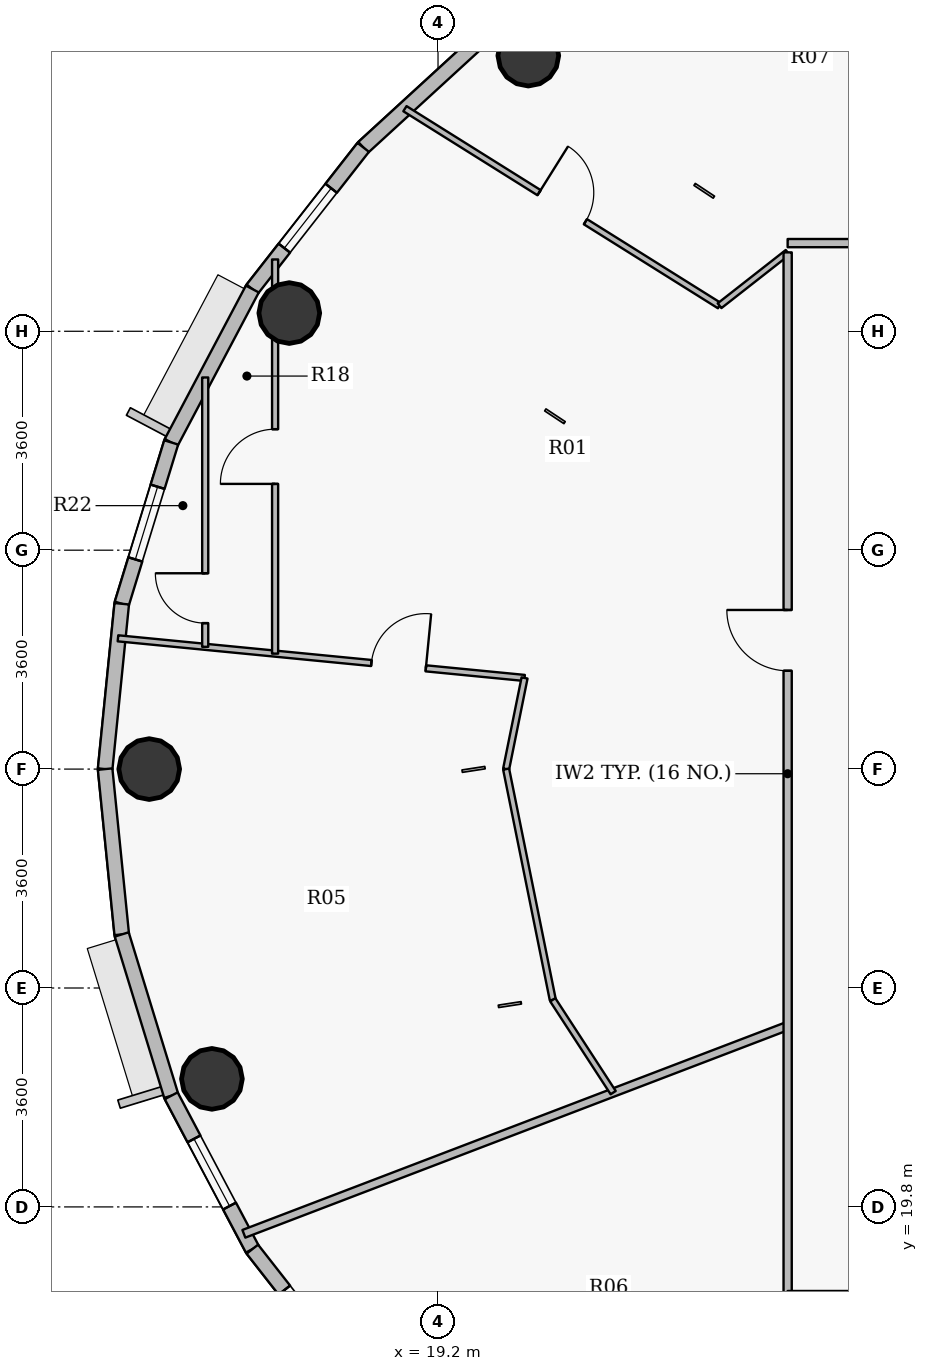
"""IFC4 building model, lengths in metres.
Left out: names, types, materials, properties, quantities, classifications, styles, units other than length and angle.
Written with IfcOpenShell. Run it as: python <this file> out.ifc"""

import sys

from ifc_helpers import new_model, si_unit, direction, frame, frame_2d, origin, origin_2d, place, context, subcontext, project, spatial, rectangle, hollow_circle, extrude, source, transform, mapped, element, fill, save


model = new_model("IFC4")
c1 = context("Model", 3, precision=1e-05, world=origin(), true_north=direction((0.0, 1.0)))
c2 = subcontext(c1, "Body", "Model", "MODEL_VIEW")
j1 = project(units=[si_unit("LENGTHUNIT", "METRE"), si_unit("PLANEANGLEUNIT", "RADIAN")], contexts=[c1])
p1 = place(None, origin())
s1 = spatial("IfcSite", under=j1, at=p1, CompositionType="ELEMENT")
p2 = place(p1, origin())
s2 = spatial("IfcBuilding", under=s1, at=p2, CompositionType="ELEMENT")
p3 = place(p2, frame((0.0, 0.0, 288.0)))
s3 = spatial("IfcBuildingStorey", under=s2, at=p3, CompositionType="ELEMENT", Elevation=288.0)
for number, where, z_axis, x_axis in (
    (1, (20.685, 38.733, 0.0), (0.0, 0.0, 1.0), (1.0, 0.0, 0.0)),
    (2, (16.754, 34.5, 0.0), (0.0, 0.0, 1.0), (1.0, 0.0, 0.0)),
    (3, (14.45, 27.0, 0.0), (0.0, 0.0, 1.0), (1.0, 0.0, 0.0)),
    (4, (15.481, 21.906, 0.0), (0.0, 0.0, 1.0), (1.0, 0.0, 0.0)),
):
    element("IfcColumn", number, at=place(p3, frame(where, z_axis=z_axis, x_axis=x_axis)), inside=s3, PredefinedType="COLUMN", context=c2, shape_type="SweptSolid", body=[
        extrude(hollow_circle(Radius=0.5, WallThickness=0.032, at=origin_2d()), origin(), (0.0, 0.0, 1.0), 3.75),
    ])
p4 = place(p3, frame((17.97, 37.225, 0.0), z_axis=(0.0, 0.0, 1.0), x_axis=(0.737068506972, 0.675818034703, 0.0)))
e5 = element("IfcWall", 5, at=p4, inside=s3, PredefinedType="SOLIDWALL", context=c2, shape_type="SweptSolid", body=[
    extrude(rectangle(XDim=3.077, YDim=0.24, at=frame_2d((1.539, 0.0))), origin(), (0.0, 0.0, 1.0), 3.5),
])
p5 = place(p3, frame((16.146, 34.895, 0.0), z_axis=(0.0, 0.0, 1.0), x_axis=(0.616337186556, 0.787482363275, 0.0)))
e6 = element("IfcWall", 6, at=p5, inside=s3, PredefinedType="SOLIDWALL", context=c2, shape_type="SweptSolid", body=[
    extrude(rectangle(XDim=2.958, YDim=0.24, at=frame_2d((1.479, 0.0))), origin(), (0.0, 0.0, 1.0), 3.5),
])
p6 = place(p5, frame((0.854, 0.0, 0.9)))
e7 = element("IfcOpeningElement", 7, at=p6, cuts=e6, PredefinedType="OPENING", context=c2, shape_type="SweptSolid", body=[
    extrude(rectangle(XDim=1.25, YDim=1.65, at=origin_2d()), frame((0.625, 0.13, 0.825), z_axis=(0.0, -1.0, 0.0), x_axis=(1.0, 0.0, 0.0)), (0.0, 0.0, 1.0), 0.26),
])
p7 = place(p3, frame((14.812, 32.372, 0.0), z_axis=(0.0, 0.0, 1.0), x_axis=(0.467628269026, 0.883925224218, 0.0)))
e8 = element("IfcWall", 8, at=p7, inside=s3, PredefinedType="SOLIDWALL", context=c2, shape_type="SweptSolid", body=[
    extrude(rectangle(XDim=2.854, YDim=0.24, at=frame_2d((1.427, 0.0))), origin(), (0.0, 0.0, 1.0), 3.5),
])
p8 = place(p3, frame((13.998, 29.719, 0.0), z_axis=(0.0, 0.0, 1.0), x_axis=(0.2931213403, 0.956075248012, 0.0)))
e9 = element("IfcWall", 9, at=p8, inside=s3, PredefinedType="SOLIDWALL", context=c2, shape_type="SweptSolid", body=[
    extrude(rectangle(XDim=2.775, YDim=0.24, at=frame_2d((1.388, 0.0))), origin(), (0.0, 0.0, 1.0), 3.5),
])
p9 = place(p8, frame((0.763, 0.0, 0.9)))
e10 = element("IfcOpeningElement", 10, at=p9, cuts=e9, PredefinedType="OPENING", context=c2, shape_type="SweptSolid", body=[
    extrude(rectangle(XDim=1.25, YDim=1.65, at=origin_2d()), frame((0.625, 0.13, 0.825), z_axis=(0.0, -1.0, 0.0), x_axis=(1.0, 0.0, 0.0)), (0.0, 0.0, 1.0), 0.26),
])
for number, where, z_axis, x_axis in (
    (11, (13.725, 27.0, 0.0), (0.0, 0.0, 1.0), (0.1, 0.995, 0.0)),
    (12, (13.998, 24.281, 0.0), (0.0, 0.0, 1.0), (-0.1, 0.995, 0.0)),
):
    element("IfcWall", number, at=place(p3, frame(where, z_axis=z_axis, x_axis=x_axis)), inside=s3, PredefinedType="SOLIDWALL", context=c2, shape_type="SweptSolid", body=[
        extrude(rectangle(XDim=2.733, YDim=0.24, at=frame_2d((1.366, 0.0))), origin(), (0.0, 0.0, 1.0), 3.5),
    ])
p10 = place(p3, frame((14.812, 21.628, 0.0), z_axis=(0.0, 0.0, 1.0), x_axis=(-0.2931213403, 0.956075248012, 0.0)))
e13 = element("IfcWall", 13, at=p10, inside=s3, PredefinedType="SOLIDWALL", context=c2, shape_type="SweptSolid", body=[
    extrude(rectangle(XDim=2.775, YDim=0.24, at=frame_2d((1.388, 0.0))), origin(), (0.0, 0.0, 1.0), 3.5),
])
p11 = place(p3, frame((16.146, 19.105, 0.0), z_axis=(0.0, 0.0, 1.0), x_axis=(-0.467628269026, 0.883925224218, 0.0)))
e14 = element("IfcWall", 14, at=p11, inside=s3, PredefinedType="SOLIDWALL", context=c2, shape_type="SweptSolid", body=[
    extrude(rectangle(XDim=2.854, YDim=0.24, at=frame_2d((1.427, 0.0))), origin(), (0.0, 0.0, 1.0), 3.5),
])
p12 = place(p11, frame((0.802, 0.0, 0.9)))
e15 = element("IfcOpeningElement", 15, at=p12, cuts=e14, PredefinedType="OPENING", context=c2, shape_type="SweptSolid", body=[
    extrude(rectangle(XDim=1.25, YDim=1.65, at=origin_2d()), frame((0.625, 0.13, 0.825), z_axis=(0.0, -1.0, 0.0), x_axis=(1.0, 0.0, 0.0)), (0.0, 0.0, 1.0), 0.26),
])
p13 = place(p3, frame((17.97, 16.775, 0.0), z_axis=(0.0, 0.0, 1.0), x_axis=(-0.616337186556, 0.787482363275, 0.0)))
e16 = element("IfcWall", 16, at=p13, inside=s3, PredefinedType="SOLIDWALL", context=c2, shape_type="SweptSolid", body=[
    extrude(rectangle(XDim=2.958, YDim=0.24, at=frame_2d((1.479, 0.0))), origin(), (0.0, 0.0, 1.0), 3.5),
])
p14 = place(p13, frame((0.854, 0.0, 0.9)))
e17 = element("IfcOpeningElement", 17, at=p14, cuts=e16, PredefinedType="OPENING", context=c2, shape_type="SweptSolid", body=[
    extrude(rectangle(XDim=1.25, YDim=1.65, at=origin_2d()), frame((0.625, 0.13, 0.825), z_axis=(0.0, -1.0, 0.0), x_axis=(1.0, 0.0, 0.0)), (0.0, 0.0, 1.0), 0.26),
])
p15 = place(p3, frame((13.936, 29.151, 0.0), z_axis=(0.0, 0.0, 1.0), x_axis=(0.995282339379, -0.097020950936, 0.0)))
e18 = element("IfcWall", 18, at=p15, inside=s3, PredefinedType="PARTITIONING", context=c2, shape_type="SweptSolid", body=[
    extrude(rectangle(XDim=6.719, YDim=0.1, at=frame_2d((3.359, 0.0))), origin(), (0.0, 0.0, 1.0), 2.985),
])
p16 = place(p15, frame((4.188, 0.0, 0.0)))
e19 = element("IfcOpeningElement", 19, at=p16, cuts=e18, PredefinedType="OPENING", context=c2, shape_type="SweptSolid", body=[
    extrude(rectangle(XDim=0.9, YDim=2.1, at=origin_2d()), frame((0.45, 0.06, 1.05), z_axis=(0.0, -1.0, 0.0), x_axis=(1.0, 0.0, 0.0)), (0.0, 0.0, 1.0), 0.12),
])
p17 = place(p3, frame((15.371, 29.011, 0.0), z_axis=(0.0, 0.0, 1.0), x_axis=(0.0, 1.0, 0.0)))
e20 = element("IfcWall", 20, at=p17, inside=s3, PredefinedType="PARTITIONING", context=c2, shape_type="SweptSolid", body=[
    extrude(rectangle(XDim=4.429, YDim=0.1, at=frame_2d((2.215, 0.0))), origin(), (0.0, 0.0, 1.0), 2.985),
])
p18 = place(p17, frame((0.389, 0.0, 0.0)))
e21 = element("IfcOpeningElement", 21, at=p18, cuts=e20, PredefinedType="OPENING", context=c2, shape_type="SweptSolid", body=[
    extrude(rectangle(XDim=0.82, YDim=2.1, at=origin_2d()), frame((0.41, 0.06, 1.05), z_axis=(0.0, -1.0, 0.0), x_axis=(1.0, 0.0, 0.0)), (0.0, 0.0, 1.0), 0.12),
])
p19 = place(p3, frame((16.007, 19.358, 0.0), z_axis=(0.0, 0.0, 1.0), x_axis=(0.934094110355, 0.35702687994, 0.0)))
e22 = element("IfcWall", 22, at=p19, inside=s3, PredefinedType="PARTITIONING", context=c2, shape_type="SweptSolid", body=[
    extrude(rectangle(XDim=9.574, YDim=0.135, at=frame_2d((4.787, 0.0))), origin(), (0.0, 0.0, 1.0), 2.985),
])
p20 = place(p3, frame((16.521, 28.899, 0.0), z_axis=(0.0, 0.0, 1.0), x_axis=(0.0, 1.0, 0.0)))
e23 = element("IfcWall", 23, at=p20, inside=s3, PredefinedType="PARTITIONING", context=c2, shape_type="SweptSolid", body=[
    extrude(rectangle(XDim=6.482, YDim=0.1, at=frame_2d((3.241, 0.0))), origin(), (0.0, 0.0, 1.0), 2.985),
])
p21 = place(p20, frame((2.791, 0.0, 0.0)))
e24 = element("IfcOpeningElement", 24, at=p21, cuts=e23, PredefinedType="OPENING", context=c2, shape_type="SweptSolid", body=[
    extrude(rectangle(XDim=0.9, YDim=2.1, at=origin_2d()), frame((0.45, 0.06, 1.05), z_axis=(0.0, -1.0, 0.0), x_axis=(1.0, 0.0, 0.0)), (0.0, 0.0, 1.0), 0.12),
])
p22 = place(p3, frame((18.656, 37.861, 0.0), z_axis=(0.0, 0.0, 1.0), x_axis=(0.847553170054, -0.530710489751, 0.0)))
e25 = element("IfcWall", 25, at=p22, inside=s3, PredefinedType="PARTITIONING", context=c2, shape_type="SweptSolid", body=[
    extrude(rectangle(XDim=6.105, YDim=0.1, at=frame_2d((3.052, 0.0))), origin(), (0.0, 0.0, 1.0), 2.985),
])
p23 = place(p22, frame((2.603, 0.0, 0.0)))
e26 = element("IfcOpeningElement", 26, at=p23, cuts=e25, PredefinedType="OPENING", context=c2, shape_type="SweptSolid", body=[
    extrude(rectangle(XDim=0.9, YDim=2.1, at=origin_2d()), frame((0.45, 0.06, 1.05), z_axis=(0.0, -1.0, 0.0), x_axis=(1.0, 0.0, 0.0)), (0.0, 0.0, 1.0), 0.12),
])
p24 = place(p3, frame((20.32, 27.0, 0.0), z_axis=(0.0, 0.0, 1.0), x_axis=(0.198264574188, 0.98014853906, 0.0)))
e27 = element("IfcWall", 27, at=p24, inside=s3, PredefinedType="PARTITIONING", context=c2, shape_type="SweptSolid", body=[
    extrude(rectangle(XDim=1.529, YDim=0.1, at=frame_2d((0.765, 0.0))), origin(), (0.0, 0.0, 1.0), 3.035),
])
p25 = place(p3, frame((20.32, 27.0, 0.0), z_axis=(0.0, 0.0, 1.0), x_axis=(0.198226068862, -0.980156327135, 0.0)))
e28 = element("IfcWall", 28, at=p25, inside=s3, PredefinedType="PARTITIONING", context=c2, shape_type="SweptSolid", body=[
    extrude(rectangle(XDim=3.871, YDim=0.1, at=frame_2d((1.936, 0.0))), origin(), (0.0, 0.0, 1.0), 3.035),
])
p26 = place(p3, frame((21.087, 23.206, 0.0), z_axis=(0.0, 0.0, 1.0), x_axis=(0.545384128846, -0.838186227519, 0.0)))
e29 = element("IfcWall", 29, at=p26, inside=s3, PredefinedType="PARTITIONING", context=c2, shape_type="SweptSolid", body=[
    extrude(rectangle(XDim=1.821, YDim=0.1, at=frame_2d((0.911, 0.0))), origin(), (0.0, 0.0, 1.0), 3.035),
])
p27 = place(p3, frame((23.83, 34.621, 0.0), z_axis=(0.0, 0.0, 1.0), x_axis=(0.787407186809, 0.616433226037, 0.0)))
e30 = element("IfcWall", 30, at=p27, inside=s3, PredefinedType="PARTITIONING", context=c2, shape_type="SweptSolid", body=[
    extrude(rectangle(XDim=1.422, YDim=0.1, at=frame_2d((0.711, 0.0))), origin(), (0.0, 0.0, 1.0), 3.035),
])
p28 = place(p3, frame((24.95, 18.35, 0.0), z_axis=(0.0, 0.0, 1.0), x_axis=(0.0, 1.0, 0.0)))
e31 = element("IfcWall", 31, at=p28, inside=s3, PredefinedType="PARTITIONING", context=c2, shape_type="SweptSolid", body=[
    extrude(rectangle(XDim=17.147, YDim=0.135, at=frame_2d((8.574, 0.0))), origin(), (0.0, 0.0, 1.0), 3.035),
])
p29 = place(p28, frame((10.267, 0.0, 0.0)))
e32 = element("IfcOpeningElement", 32, at=p29, cuts=e31, PredefinedType="OPENING", context=c2, shape_type="SweptSolid", body=[
    extrude(rectangle(XDim=1.0, YDim=2.15, at=origin_2d()), frame((0.5, 0.078, 1.075), z_axis=(0.0, -1.0, 0.0), x_axis=(1.0, 0.0, 0.0)), (0.0, 0.0, 1.0), 0.155),
])
p30 = place(p3, frame((24.95, 18.35, 0.0), z_axis=(0.0, 0.0, 1.0), x_axis=(1.0, 0.0, 0.0)))
e33 = element("IfcWall", 33, at=p30, inside=s3, PredefinedType="PARTITIONING", context=c2, shape_type="SweptSolid", body=[
    extrude(rectangle(XDim=10.1, YDim=0.135, at=frame_2d((5.05, 0.0))), origin(), (0.0, 0.0, 1.0), 3.035),
])
p31 = place(p30, frame((4.627, 0.0, 0.0)))
e34 = element("IfcOpeningElement", 34, at=p31, cuts=e33, PredefinedType="OPENING", context=c2, shape_type="SweptSolid", body=[
    extrude(rectangle(XDim=1.0, YDim=2.15, at=origin_2d()), frame((0.5, 0.078, 1.075), z_axis=(0.0, -1.0, 0.0), x_axis=(1.0, 0.0, 0.0)), (0.0, 0.0, 1.0), 0.155),
])
p32 = place(p3, frame((24.95, 35.65, 0.0), z_axis=(0.0, 0.0, 1.0), x_axis=(1.0, 0.0, 0.0)))
e35 = element("IfcWall", 35, at=p32, inside=s3, PredefinedType="PARTITIONING", context=c2, shape_type="SweptSolid", body=[
    extrude(rectangle(XDim=10.1, YDim=0.135, at=frame_2d((5.05, 0.0))), origin(), (0.0, 0.0, 1.0), 3.035),
])
m1 = source(origin(), c2, "Body", "SweptSolid", [
    extrude(rectangle(XDim=1.25, YDim=1.65, at=origin_2d()), frame((0.625, 0.03, 0.825), z_axis=(0.0, -1.0, 0.0), x_axis=(1.0, 0.0, 0.0)), (0.0, 0.0, 1.0), 0.06),
])
p33 = place(p9, origin())
e36 = element("IfcWindow", 36, at=p33, inside=s3, PartitioningType="SINGLE_PANEL", PredefinedType="WINDOW", context=c2, shape_type="MappedRepresentation", body=[
    mapped(m1, transform((0.0, 0.0, 0.0), x_axis=(1.0, 0.0, 0.0), y_axis=(0.0, 1.0, 0.0), z_axis=(0.0, 0.0, 1.0), scale=1.0)),
])
fill(e10, e36)
p34 = place(p14, origin())
e37 = element("IfcWindow", 37, at=p34, inside=s3, PartitioningType="SINGLE_PANEL", PredefinedType="WINDOW", context=c2, shape_type="MappedRepresentation", body=[
    mapped(m1, transform((0.0, 0.0, 0.0), x_axis=(1.0, 0.0, 0.0), y_axis=(0.0, 1.0, 0.0), z_axis=(0.0, 0.0, 1.0), scale=1.0)),
])
fill(e17, e37)
p35 = place(p6, origin())
e38 = element("IfcWindow", 38, at=p35, inside=s3, PartitioningType="SINGLE_PANEL", PredefinedType="WINDOW", context=c2, shape_type="MappedRepresentation", body=[
    mapped(m1, transform((0.0, 0.0, 0.0), x_axis=(1.0, 0.0, 0.0), y_axis=(0.0, 1.0, 0.0), z_axis=(0.0, 0.0, 1.0), scale=1.0)),
])
fill(e7, e38)
p36 = place(p12, origin())
e39 = element("IfcWindow", 39, at=p36, inside=s3, PartitioningType="SINGLE_PANEL", PredefinedType="WINDOW", context=c2, shape_type="MappedRepresentation", body=[
    mapped(m1, transform((0.0, 0.0, 0.0), x_axis=(1.0, 0.0, 0.0), y_axis=(0.0, 1.0, 0.0), z_axis=(0.0, 0.0, 1.0), scale=1.0)),
])
fill(e15, e39)
m2 = source(origin(), c2, "Body", "SweptSolid", [
    extrude(rectangle(XDim=1.0, YDim=2.15, at=origin_2d()), frame((0.5, 0.025, 1.075), z_axis=(0.0, -1.0, 0.0), x_axis=(1.0, 0.0, 0.0)), (0.0, 0.0, 1.0), 0.05),
])
p37 = place(p29, origin())
e40 = element("IfcDoor", 40, at=p37, inside=s3, OperationType="SINGLE_SWING_RIGHT", PredefinedType="DOOR", context=c2, shape_type="MappedRepresentation", body=[
    mapped(m2, transform((0.0, 0.0, 0.0), x_axis=(1.0, 0.0, 0.0), y_axis=(0.0, 1.0, 0.0), z_axis=(0.0, 0.0, 1.0), scale=1.0)),
])
fill(e32, e40)
m3 = source(origin(), c2, "Body", "SweptSolid", [
    extrude(rectangle(XDim=0.9, YDim=2.1, at=origin_2d()), frame((0.45, 0.025, 1.05), z_axis=(0.0, -1.0, 0.0), x_axis=(1.0, 0.0, 0.0)), (0.0, 0.0, 1.0), 0.05),
])
p38 = place(p23, origin())
e41 = element("IfcDoor", 41, at=p38, inside=s3, OperationType="SINGLE_SWING_LEFT", PredefinedType="DOOR", context=c2, shape_type="MappedRepresentation", body=[
    mapped(m3, transform((0.0, 0.0, 0.0), x_axis=(1.0, 0.0, 0.0), y_axis=(0.0, 1.0, 0.0), z_axis=(0.0, 0.0, 1.0), scale=1.0)),
])
fill(e26, e41)
p39 = place(p16, origin())
e42 = element("IfcDoor", 42, at=p39, inside=s3, OperationType="SINGLE_SWING_RIGHT", PredefinedType="DOOR", context=c2, shape_type="MappedRepresentation", body=[
    mapped(m3, transform((0.0, 0.0, 0.0), x_axis=(1.0, 0.0, 0.0), y_axis=(0.0, 1.0, 0.0), z_axis=(0.0, 0.0, 1.0), scale=1.0)),
])
fill(e19, e42)
p40 = place(p21, origin())
e43 = element("IfcDoor", 43, at=p40, inside=s3, OperationType="SINGLE_SWING_LEFT", PredefinedType="DOOR", context=c2, shape_type="MappedRepresentation", body=[
    mapped(m3, transform((0.0, 0.0, 0.0), x_axis=(1.0, 0.0, 0.0), y_axis=(0.0, 1.0, 0.0), z_axis=(0.0, 0.0, 1.0), scale=1.0)),
])
fill(e24, e43)
m4 = source(origin(), c2, "Body", "SweptSolid", [
    extrude(rectangle(XDim=0.82, YDim=2.1, at=origin_2d()), frame((0.41, 0.025, 1.05), z_axis=(0.0, -1.0, 0.0), x_axis=(1.0, 0.0, 0.0)), (0.0, 0.0, 1.0), 0.05),
])
p41 = place(p18, origin())
e44 = element("IfcDoor", 44, at=p41, inside=s3, OperationType="SINGLE_SWING_RIGHT", PredefinedType="DOOR", context=c2, shape_type="MappedRepresentation", body=[
    mapped(m4, transform((0.0, 0.0, 0.0), x_axis=(1.0, 0.0, 0.0), y_axis=(0.0, 1.0, 0.0), z_axis=(0.0, 0.0, 1.0), scale=1.0)),
])
fill(e21, e44)
save(model, sys.argv[1])
